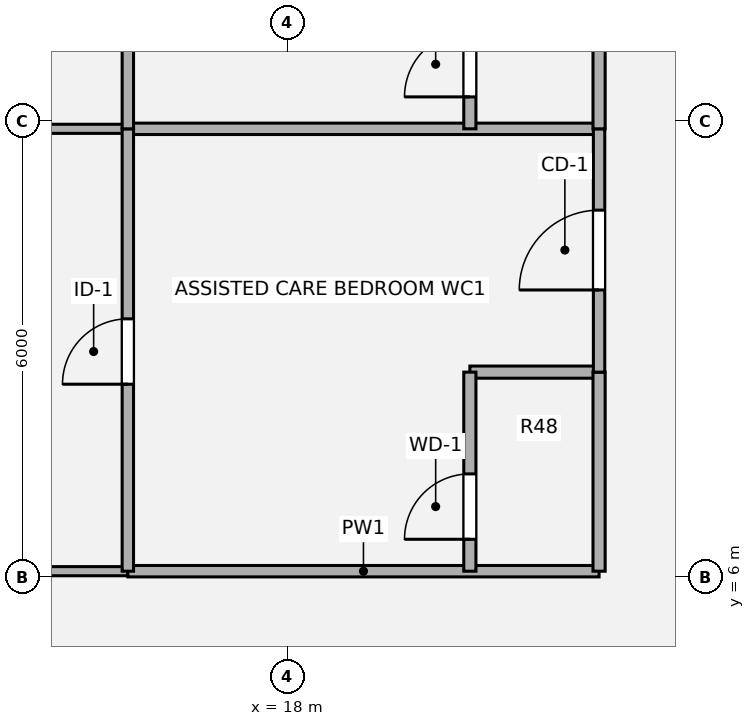
"""IFC4 building model, lengths in metres.
Left out: names, types, materials, properties, quantities, classifications, styles, units other than length and angle.
Written with IfcOpenShell. Run it as: python <this file> out.ifc"""

import sys

from ifc_helpers import new_model, si_unit, direction, frame, frame_2d, origin, origin_2d, place, context, subcontext, project, spatial, rectangle, extrude, source, transform, mapped, element, fill, save


model = new_model("IFC4")
c1 = context("Model", 3, precision=1e-05, world=origin(), true_north=direction((0.0, 1.0)))
c2 = subcontext(c1, "Body", "Model", "MODEL_VIEW")
j1 = project(units=[si_unit("LENGTHUNIT", "METRE"), si_unit("PLANEANGLEUNIT", "RADIAN")], contexts=[c1])
p1 = place(None, origin())
s1 = spatial("IfcSite", under=j1, at=p1, CompositionType="ELEMENT")
p2 = place(p1, origin())
s2 = spatial("IfcBuilding", under=s1, at=p2, CompositionType="ELEMENT")
p3 = place(p2, frame((0.0, 0.0, 42.12)))
s3 = spatial("IfcBuildingStorey", under=s2, at=p3, CompositionType="ELEMENT", Elevation=42.12)
p4 = place(p3, frame((12.08, 6.08, 0.0), z_axis=(0.0, 0.0, 1.0), x_axis=(1.0, 0.0, 0.0)))
e1 = element("IfcWall", 1, at=p4, inside=s3, PredefinedType="PARTITIONING", context=c2, shape_type="SweptSolid", body=[
    extrude(rectangle(XDim=3.82, YDim=0.12, at=frame_2d((1.91, 0.0))), origin(), (0.0, 0.0, 1.0), 3.5),
])
p5 = place(p3, frame((15.9, 6.08, 0.0), z_axis=(0.0, 0.0, 1.0), x_axis=(1.0, 0.0, 0.0)))
e2 = element("IfcWall", 2, at=p5, inside=s3, PredefinedType="PARTITIONING", context=c2, shape_type="SweptSolid", body=[
    extrude(rectangle(XDim=6.2, YDim=0.15, at=frame_2d((3.1, 0.0))), origin(), (0.0, 0.0, 1.0), 3.5),
])
p6 = place(p3, frame((20.4, 8.699, 0.0), z_axis=(0.0, 0.0, 1.0), x_axis=(1.0, 0.0, 0.0)))
e3 = element("IfcWall", 3, at=p6, inside=s3, PredefinedType="PLUMBINGWALL", context=c2, shape_type="SweptSolid", body=[
    extrude(rectangle(XDim=1.7, YDim=0.16, at=frame_2d((0.85, 0.0))), origin(), (0.0, 0.0, 1.0), 3.5),
])
p7 = place(p3, frame((12.08, 11.9, 0.0), z_axis=(0.0, 0.0, 1.0), x_axis=(1.0, 0.0, 0.0)))
e4 = element("IfcWall", 4, at=p7, inside=s3, PredefinedType="PARTITIONING", context=c2, shape_type="SweptSolid", body=[
    extrude(rectangle(XDim=3.82, YDim=0.12, at=frame_2d((1.91, 0.0))), origin(), (0.0, 0.0, 1.0), 3.5),
])
p8 = place(p3, frame((15.9, 11.9, 0.0), z_axis=(0.0, 0.0, 1.0), x_axis=(1.0, 0.0, 0.0)))
e5 = element("IfcWall", 5, at=p8, inside=s3, PredefinedType="PARTITIONING", context=c2, shape_type="SweptSolid", body=[
    extrude(rectangle(XDim=6.2, YDim=0.15, at=frame_2d((3.1, 0.0))), origin(), (0.0, 0.0, 1.0), 3.5),
])
p9 = place(p3, frame((15.9, 6.08, 0.0), z_axis=(0.0, 0.0, 1.0), x_axis=(0.0, 1.0, 0.0)))
e6 = element("IfcWall", 6, at=p9, inside=s3, PredefinedType="PARTITIONING", context=c2, shape_type="SweptSolid", body=[
    extrude(rectangle(XDim=5.82, YDim=0.15, at=frame_2d((2.91, 0.0))), origin(), (0.0, 0.0, 1.0), 3.5),
])
p10 = place(p9, frame((2.46, 0.0, 0.0)))
e7 = element("IfcOpeningElement", 7, at=p10, cuts=e6, PredefinedType="OPENING", context=c2, shape_type="SweptSolid", body=[
    extrude(rectangle(XDim=0.86, YDim=2.1, at=origin_2d()), frame((0.43, 0.085, 1.05), z_axis=(0.0, -1.0, 0.0), x_axis=(1.0, 0.0, 0.0)), (0.0, 0.0, 1.0), 0.17),
])
p11 = place(p3, frame((15.9, 11.9, 0.0), z_axis=(0.0, 0.0, 1.0), x_axis=(0.0, 1.0, 0.0)))
e8 = element("IfcWall", 8, at=p11, inside=s3, PredefinedType="PARTITIONING", context=c2, shape_type="SweptSolid", body=[
    extrude(rectangle(XDim=5.9, YDim=0.15, at=frame_2d((2.95, 0.0))), origin(), (0.0, 0.0, 1.0), 3.5),
])
p12 = place(p11, frame((2.14, 0.0, 0.0)))
e9 = element("IfcOpeningElement", 9, at=p12, cuts=e8, PredefinedType="OPENING", context=c2, shape_type="SweptSolid", body=[
    extrude(rectangle(XDim=0.86, YDim=2.1, at=origin_2d()), frame((0.43, 0.085, 1.05), z_axis=(0.0, -1.0, 0.0), x_axis=(1.0, 0.0, 0.0)), (0.0, 0.0, 1.0), 0.17),
])
p13 = place(p3, frame((20.4, 6.08, 0.0), z_axis=(0.0, 0.0, 1.0), x_axis=(0.0, 1.0, 0.0)))
e10 = element("IfcWall", 10, at=p13, inside=s3, PredefinedType="PLUMBINGWALL", context=c2, shape_type="SweptSolid", body=[
    extrude(rectangle(XDim=2.619, YDim=0.16, at=frame_2d((1.31, 0.0))), origin(), (0.0, 0.0, 1.0), 3.5),
])
p14 = place(p13, frame((0.42, 0.0, 0.0)))
e11 = element("IfcOpeningElement", 11, at=p14, cuts=e10, PredefinedType="OPENING", context=c2, shape_type="SweptSolid", body=[
    extrude(rectangle(XDim=0.86, YDim=2.1, at=origin_2d()), frame((0.43, 0.09, 1.05), z_axis=(0.0, -1.0, 0.0), x_axis=(1.0, 0.0, 0.0)), (0.0, 0.0, 1.0), 0.18),
])
p15 = place(p3, frame((20.4, 11.9, 0.0), z_axis=(0.0, 0.0, 1.0), x_axis=(0.0, 1.0, 0.0)))
e12 = element("IfcWall", 12, at=p15, inside=s3, PredefinedType="PLUMBINGWALL", context=c2, shape_type="SweptSolid", body=[
    extrude(rectangle(XDim=2.655, YDim=0.16, at=frame_2d((1.328, 0.0))), origin(), (0.0, 0.0, 1.0), 3.5),
])
p16 = place(p15, frame((0.42, 0.0, 0.0)))
e13 = element("IfcOpeningElement", 13, at=p16, cuts=e12, PredefinedType="OPENING", context=c2, shape_type="SweptSolid", body=[
    extrude(rectangle(XDim=0.86, YDim=2.1, at=origin_2d()), frame((0.43, 0.09, 1.05), z_axis=(0.0, -1.0, 0.0), x_axis=(1.0, 0.0, 0.0)), (0.0, 0.0, 1.0), 0.18),
])
p17 = place(p3, frame((22.1, 6.08, 0.0), z_axis=(0.0, 0.0, 1.0), x_axis=(0.0, 1.0, 0.0)))
e14 = element("IfcWall", 14, at=p17, inside=s3, PredefinedType="PLUMBINGWALL", context=c2, shape_type="SweptSolid", body=[
    extrude(rectangle(XDim=2.619, YDim=0.16, at=frame_2d((1.31, 0.0))), origin(), (0.0, 0.0, 1.0), 3.5),
])
p18 = place(p3, frame((22.1, 8.699, 0.0), z_axis=(0.0, 0.0, 1.0), x_axis=(0.0, 1.0, 0.0)))
e15 = element("IfcWall", 15, at=p18, inside=s3, PredefinedType="PARTITIONING", context=c2, shape_type="SweptSolid", body=[
    extrude(rectangle(XDim=3.201, YDim=0.15, at=frame_2d((1.601, 0.0))), origin(), (0.0, 0.0, 1.0), 3.5),
])
p19 = place(p18, frame((1.081, 0.0, 0.0)))
e16 = element("IfcOpeningElement", 16, at=p19, cuts=e15, PredefinedType="OPENING", context=c2, shape_type="SweptSolid", body=[
    extrude(rectangle(XDim=1.05, YDim=2.1, at=origin_2d()), frame((0.525, 0.085, 1.05), z_axis=(0.0, -1.0, 0.0), x_axis=(1.0, 0.0, 0.0)), (0.0, 0.0, 1.0), 0.17),
])
p20 = place(p3, frame((22.1, 11.9, 0.0), z_axis=(0.0, 0.0, 1.0), x_axis=(0.0, 1.0, 0.0)))
e17 = element("IfcWall", 17, at=p20, inside=s3, PredefinedType="PLUMBINGWALL", context=c2, shape_type="SweptSolid", body=[
    extrude(rectangle(XDim=2.655, YDim=0.16, at=frame_2d((1.328, 0.0))), origin(), (0.0, 0.0, 1.0), 3.5),
])
m1 = source(origin(), c2, "Body", "SweptSolid", [
    extrude(rectangle(XDim=0.86, YDim=2.1, at=origin_2d()), frame((0.43, 0.025, 1.05), z_axis=(0.0, -1.0, 0.0), x_axis=(1.0, 0.0, 0.0)), (0.0, 0.0, 1.0), 0.05),
])
p21 = place(p10, origin())
e18 = element("IfcDoor", 18, at=p21, inside=s3, OperationType="SINGLE_SWING_LEFT", PredefinedType="DOOR", context=c2, shape_type="MappedRepresentation", body=[
    mapped(m1, transform((0.0, 0.0, 0.0), x_axis=(1.0, 0.0, 0.0), y_axis=(0.0, 1.0, 0.0), z_axis=(0.0, 0.0, 1.0), scale=1.0)),
])
fill(e7, e18)
m2 = source(origin(), c2, "Body", "SweptSolid", [
    extrude(rectangle(XDim=0.86, YDim=2.1, at=origin_2d()), frame((0.43, 0.025, 1.05), z_axis=(0.0, -1.0, 0.0), x_axis=(1.0, 0.0, 0.0)), (0.0, 0.0, 1.0), 0.05),
])
p22 = place(p14, origin())
e19 = element("IfcDoor", 19, at=p22, inside=s3, OperationType="SINGLE_SWING_LEFT", PredefinedType="DOOR", context=c2, shape_type="MappedRepresentation", body=[
    mapped(m2, transform((0.0, 0.0, 0.0), x_axis=(1.0, 0.0, 0.0), y_axis=(0.0, 1.0, 0.0), z_axis=(0.0, 0.0, 1.0), scale=1.0)),
])
fill(e11, e19)
p23 = place(p16, origin())
e20 = element("IfcDoor", 20, at=p23, inside=s3, OperationType="SINGLE_SWING_LEFT", PredefinedType="DOOR", context=c2, shape_type="MappedRepresentation", body=[
    mapped(m2, transform((0.0, 0.0, 0.0), x_axis=(1.0, 0.0, 0.0), y_axis=(0.0, 1.0, 0.0), z_axis=(0.0, 0.0, 1.0), scale=1.0)),
])
fill(e13, e20)
m3 = source(origin(), c2, "Body", "SweptSolid", [
    extrude(rectangle(XDim=1.05, YDim=2.1, at=origin_2d()), frame((0.525, 0.025, 1.05), z_axis=(0.0, -1.0, 0.0), x_axis=(1.0, 0.0, 0.0)), (0.0, 0.0, 1.0), 0.05),
])
p24 = place(p19, origin())
e21 = element("IfcDoor", 21, at=p24, inside=s3, OperationType="SINGLE_SWING_LEFT", PredefinedType="DOOR", context=c2, shape_type="MappedRepresentation", body=[
    mapped(m3, transform((0.0, 0.0, 0.0), x_axis=(1.0, 0.0, 0.0), y_axis=(0.0, 1.0, 0.0), z_axis=(0.0, 0.0, 1.0), scale=1.0)),
])
fill(e16, e21)
save(model, sys.argv[1])
